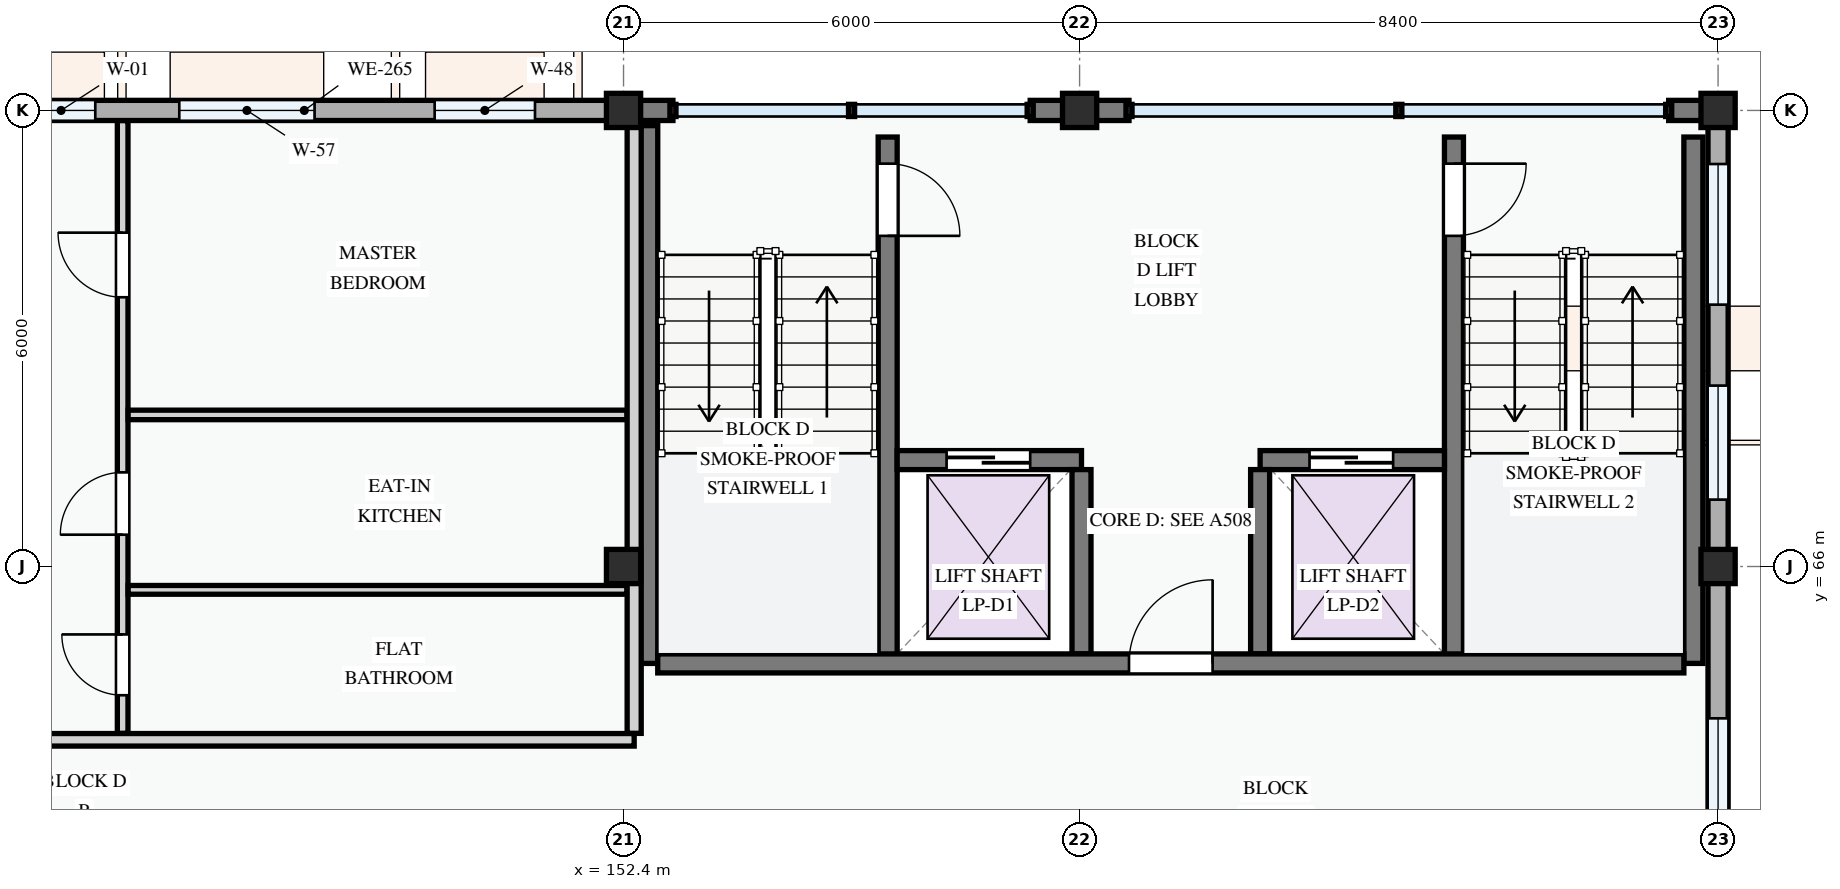
"""IFC4 building model, lengths in metres.
Left out: names, types, materials, properties, quantities, classifications, styles, units other than length and angle.
Written with IfcOpenShell. Run it as: python <this file> out.ifc"""

import sys

from ifc_helpers import new_model, si_unit, direction, frame, frame_2d, origin, origin_2d, place, context, subcontext, project, spatial, rectangle, extrude, element, fill, save


model = new_model("IFC4")
c1 = context("Model", 3, precision=1e-05, world=origin(), true_north=direction((0.0, 1.0)))
c2 = subcontext(c1, "Body", "Model", "MODEL_VIEW")
j1 = project(units=[si_unit("LENGTHUNIT", "METRE"), si_unit("PLANEANGLEUNIT", "RADIAN")], contexts=[c1])
p1 = place(None, origin())
s1 = spatial("IfcSite", under=j1, at=p1, CompositionType="ELEMENT")
p2 = place(p1, origin())
s2 = spatial("IfcBuilding", under=s1, at=p2, CompositionType="ELEMENT")
p3 = place(p2, frame((0.0, 0.0, 24.6)))
s3 = spatial("IfcBuildingStorey", under=s2, at=p3, CompositionType="ELEMENT", Elevation=24.6)
for number, where, z_axis, x_axis in (
    (1, (152.4, 66.0, 0.0), (0.0, 0.0, 1.0), (1.0, 0.0, 0.0)),
    (2, (152.4, 72.0, 0.0), (0.0, 0.0, 1.0), (1.0, 0.0, 0.0)),
    (3, (158.4, 72.0, 0.0), (0.0, 0.0, 1.0), (1.0, 0.0, 0.0)),
    (4, (166.8, 66.0, 0.0), (0.0, 0.0, 1.0), (1.0, 0.0, 0.0)),
    (5, (166.8, 72.0, 0.0), (0.0, 0.0, 1.0), (1.0, 0.0, 0.0)),
):
    element("IfcColumn", number, at=place(p3, frame(where, z_axis=z_axis, x_axis=x_axis)), inside=s3, PredefinedType="COLUMN", context=c2, shape_type="SweptSolid", body=[
        extrude(rectangle(XDim=0.45, YDim=0.45, at=origin_2d()), origin(), (0.0, 0.0, 1.0), 3.3),
    ])
p4 = place(p3, frame((152.4, 72.0, 0.0), z_axis=(0.0, 0.0, 1.0), x_axis=(-1.0, 0.0, 0.0)))
e6 = element("IfcWall", 6, at=p4, inside=s3, PredefinedType="STANDARD", context=c2, shape_type="SweptSolid", body=[
    extrude(rectangle(XDim=8.4, YDim=0.265, at=frame_2d((4.2, 0.0))), origin(), (0.0, 0.0, 1.0), 2.375),
])
p5 = place(p4, frame((1.165, 0.0, 0.78)))
e7 = element("IfcOpeningElement", 7, at=p5, cuts=e6, PredefinedType="OPENING", context=c2, shape_type="SweptSolid", body=[
    extrude(rectangle(XDim=1.32, YDim=1.35, at=frame_2d((0.66, 0.675))), frame((0.0, 0.143, 0.0), z_axis=(0.0, -1.0, 0.0), x_axis=(1.0, 0.0, 0.0)), (0.0, 0.0, 1.0), 0.285),
])
p6 = place(p4, frame((4.065, 0.0, 0.78)))
e8 = element("IfcOpeningElement", 8, at=p6, cuts=e6, PredefinedType="OPENING", context=c2, shape_type="SweptSolid", body=[
    extrude(rectangle(XDim=1.78, YDim=1.42, at=frame_2d((0.89, 0.71))), frame((0.0, 0.143, 0.0), z_axis=(0.0, -1.0, 0.0), x_axis=(1.0, 0.0, 0.0)), (0.0, 0.0, 1.0), 0.285),
])
p7 = place(p4, frame((6.95, 0.0, 0.78)))
e9 = element("IfcOpeningElement", 9, at=p7, cuts=e6, PredefinedType="OPENING", context=c2, shape_type="SweptSolid", body=[
    extrude(rectangle(XDim=0.9, YDim=1.2, at=frame_2d((0.45, 0.6))), frame((0.0, 0.143, 0.0), z_axis=(0.0, -1.0, 0.0), x_axis=(1.0, 0.0, 0.0)), (0.0, 0.0, 1.0), 0.285),
])
p8 = place(p3, frame((166.8, 57.6, 0.0), z_axis=(0.0, 0.0, 1.0), x_axis=(0.0, 1.0, 0.0)))
e10 = element("IfcWall", 10, at=p8, inside=s3, PredefinedType="STANDARD", context=c2, shape_type="SweptSolid", body=[
    extrude(rectangle(XDim=8.4, YDim=0.265, at=frame_2d((4.2, 0.0))), origin(), (0.0, 0.0, 1.0), 2.425),
])
p9 = place(p8, frame((0.955, 0.0, 0.78)))
e11 = element("IfcOpeningElement", 11, at=p9, cuts=e10, PredefinedType="OPENING", context=c2, shape_type="SweptSolid", body=[
    extrude(rectangle(XDim=2.48, YDim=1.46, at=frame_2d((1.24, 0.73))), frame((0.0, 0.143, 0.0), z_axis=(0.0, -1.0, 0.0), x_axis=(1.0, 0.0, 0.0)), (0.0, 0.0, 1.0), 0.285),
])
p10 = place(p8, frame((4.923, 0.0, 0.78)))
e12 = element("IfcOpeningElement", 12, at=p10, cuts=e10, PredefinedType="OPENING", context=c2, shape_type="SweptSolid", body=[
    extrude(rectangle(XDim=1.48, YDim=1.52, at=frame_2d((0.74, 0.76))), frame((0.0, 0.143, 0.0), z_axis=(0.0, -1.0, 0.0), x_axis=(1.0, 0.0, 0.0)), (0.0, 0.0, 1.0), 0.285),
])
p11 = place(p3, frame((166.8, 66.0, 0.0), z_axis=(0.0, 0.0, 1.0), x_axis=(0.0, 1.0, 0.0)))
e13 = element("IfcWall", 13, at=p11, inside=s3, PredefinedType="STANDARD", context=c2, shape_type="SweptSolid", body=[
    extrude(rectangle(XDim=6.0, YDim=0.265, at=frame_2d((3.0, 0.0))), origin(), (0.0, 0.0, 1.0), 2.575),
])
p12 = place(p11, frame((0.88, 0.0, 0.78)))
e14 = element("IfcOpeningElement", 14, at=p12, cuts=e13, PredefinedType="OPENING", context=c2, shape_type="SweptSolid", body=[
    extrude(rectangle(XDim=1.5, YDim=1.65, at=frame_2d((0.75, 0.825))), frame((0.0, 0.143, 0.0), z_axis=(0.0, -1.0, 0.0), x_axis=(1.0, 0.0, 0.0)), (0.0, 0.0, 1.0), 0.285),
])
p13 = place(p11, frame((3.445, 0.0, 0.78)))
e15 = element("IfcOpeningElement", 15, at=p13, cuts=e13, PredefinedType="OPENING", context=c2, shape_type="SweptSolid", body=[
    extrude(rectangle(XDim=1.85, YDim=1.6, at=frame_2d((0.925, 0.8))), frame((0.0, 0.143, 0.0), z_axis=(0.0, -1.0, 0.0), x_axis=(1.0, 0.0, 0.0)), (0.0, 0.0, 1.0), 0.285),
])
p14 = place(p3, frame((166.666, 72.0, 0.0), z_axis=(0.0, 0.0, 1.0), x_axis=(-1.0, 0.0, 0.0)))
e16 = element("IfcWall", 16, at=p14, inside=s3, PredefinedType="STANDARD", context=c2, shape_type="SweptSolid", body=[
    extrude(rectangle(XDim=0.516, YDim=0.265, at=frame_2d((0.258, 0.0))), origin(), (0.0, 0.0, 1.0), 3.04),
])
p15 = place(p3, frame((159.05, 72.0, 0.0), z_axis=(0.0, 0.0, 1.0), x_axis=(-1.0, 0.0, 0.0)))
e17 = element("IfcWall", 17, at=p15, inside=s3, PredefinedType="STANDARD", context=c2, shape_type="SweptSolid", body=[
    extrude(rectangle(XDim=0.65, YDim=0.265, at=frame_2d((0.325, 0.0))), origin(), (0.0, 0.0, 1.0), 3.04),
])
p16 = place(p3, frame((158.4, 72.0, 0.0), z_axis=(0.0, 0.0, 1.0), x_axis=(-1.0, 0.0, 0.0)))
e18 = element("IfcWall", 18, at=p16, inside=s3, PredefinedType="STANDARD", context=c2, shape_type="SweptSolid", body=[
    extrude(rectangle(XDim=0.65, YDim=0.265, at=frame_2d((0.325, 0.0))), origin(), (0.0, 0.0, 1.0), 3.04),
])
p17 = place(p3, frame((153.05, 72.0, 0.0), z_axis=(0.0, 0.0, 1.0), x_axis=(-1.0, 0.0, 0.0)))
e19 = element("IfcWall", 19, at=p17, inside=s3, PredefinedType="STANDARD", context=c2, shape_type="SweptSolid", body=[
    extrude(rectangle(XDim=0.65, YDim=0.265, at=frame_2d((0.325, 0.0))), origin(), (0.0, 0.0, 1.0), 3.04),
])
p18 = place(p3, frame((155.875, 71.65, 0.0), z_axis=(0.0, 0.0, 1.0), x_axis=(0.0, -1.0, 0.0)))
e20 = element("IfcWall", 20, at=p18, inside=s3, PredefinedType="SHEAR", context=c2, shape_type="SweptSolid", body=[
    extrude(rectangle(XDim=6.925, YDim=0.25, at=frame_2d((3.462, 0.0))), origin(), (0.0, 0.0, 1.0), 3.0),
])
p19 = place(p18, frame((0.35, 0.0, 0.0)))
e21 = element("IfcOpeningElement", 21, at=p19, cuts=e20, PredefinedType="OPENING", context=c2, shape_type="SweptSolid", body=[
    extrude(rectangle(XDim=0.95, YDim=2.1, at=frame_2d((0.475, 1.05))), frame((0.0, 0.135, 0.0), z_axis=(0.0, -1.0, 0.0), x_axis=(1.0, 0.0, 0.0)), (0.0, 0.0, 1.0), 0.27),
])
p20 = place(p3, frame((152.725, 71.8, 0.0), z_axis=(0.0, 0.0, 1.0), x_axis=(0.0, -1.0, 0.0)))
e22 = element("IfcWall", 22, at=p20, inside=s3, PredefinedType="SHEAR", context=c2, shape_type="SweptSolid", body=[
    extrude(rectangle(XDim=7.075, YDim=0.25, at=frame_2d((3.538, 0.0))), origin(), (0.0, 0.0, 1.0), 3.0),
])
p21 = place(p3, frame((166.475, 71.65, 0.0), z_axis=(0.0, 0.0, 1.0), x_axis=(0.0, -1.0, 0.0)))
e23 = element("IfcWall", 23, at=p21, inside=s3, PredefinedType="SHEAR", context=c2, shape_type="SweptSolid", body=[
    extrude(rectangle(XDim=6.925, YDim=0.25, at=frame_2d((3.462, 0.0))), origin(), (0.0, 0.0, 1.0), 3.0),
])
p22 = place(p3, frame((163.325, 71.65, 0.0), z_axis=(0.0, 0.0, 1.0), x_axis=(0.0, -1.0, 0.0)))
e24 = element("IfcWall", 24, at=p22, inside=s3, PredefinedType="SHEAR", context=c2, shape_type="SweptSolid", body=[
    extrude(rectangle(XDim=6.925, YDim=0.25, at=frame_2d((3.462, 0.0))), origin(), (0.0, 0.0, 1.0), 3.0),
])
p23 = place(p22, frame((0.35, 0.0, 0.0)))
e25 = element("IfcOpeningElement", 25, at=p23, cuts=e24, PredefinedType="OPENING", context=c2, shape_type="SweptSolid", body=[
    extrude(rectangle(XDim=0.95, YDim=2.1, at=frame_2d((0.475, 1.05))), frame((0.0, 0.135, 0.0), z_axis=(0.0, -1.0, 0.0), x_axis=(1.0, 0.0, 0.0)), (0.0, 0.0, 1.0), 0.27),
])
p24 = place(p3, frame((156.0, 67.4, 0.0), z_axis=(0.0, 0.0, 1.0), x_axis=(1.0, 0.0, 0.0)))
e26 = element("IfcWall", 26, at=p24, inside=s3, PredefinedType="SHEAR", context=c2, shape_type="SweptSolid", body=[
    extrude(rectangle(XDim=2.425, YDim=0.25, at=frame_2d((1.212, 0.0))), origin(), (0.0, 0.0, 1.0), 3.0),
])
p25 = place(p24, frame((0.65, 0.0, 0.0)))
e27 = element("IfcOpeningElement", 27, at=p25, cuts=e26, PredefinedType="OPENING", context=c2, shape_type="SweptSolid", body=[
    extrude(rectangle(XDim=1.1, YDim=2.15, at=frame_2d((0.55, 1.075))), frame((0.0, 0.135, 0.0), z_axis=(0.0, -1.0, 0.0), x_axis=(1.0, 0.0, 0.0)), (0.0, 0.0, 1.0), 0.27),
])
p26 = place(p3, frame((160.775, 67.4, 0.0), z_axis=(0.0, 0.0, 1.0), x_axis=(1.0, 0.0, 0.0)))
e28 = element("IfcWall", 28, at=p26, inside=s3, PredefinedType="SHEAR", context=c2, shape_type="SweptSolid", body=[
    extrude(rectangle(XDim=2.425, YDim=0.25, at=frame_2d((1.212, 0.0))), origin(), (0.0, 0.0, 1.0), 3.0),
])
p27 = place(p26, frame((0.65, 0.0, 0.0)))
e29 = element("IfcOpeningElement", 29, at=p27, cuts=e28, PredefinedType="OPENING", context=c2, shape_type="SweptSolid", body=[
    extrude(rectangle(XDim=1.1, YDim=2.15, at=frame_2d((0.55, 1.075))), frame((0.0, 0.135, 0.0), z_axis=(0.0, -1.0, 0.0), x_axis=(1.0, 0.0, 0.0)), (0.0, 0.0, 1.0), 0.27),
])
for number, where, z_axis, x_axis in (
    (30, (158.425, 67.275, 0.0), (0.0, 0.0, 1.0), (0.0, -1.0, 0.0)),
    (31, (160.775, 67.275, 0.0), (0.0, 0.0, 1.0), (0.0, -1.0, 0.0)),
):
    element("IfcWall", number, at=place(p3, frame(where, z_axis=z_axis, x_axis=x_axis)), inside=s3, PredefinedType="SHEAR", context=c2, shape_type="SweptSolid", body=[
        extrude(rectangle(XDim=2.425, YDim=0.25, at=frame_2d((1.212, 0.0))), origin(), (0.0, 0.0, 1.0), 3.0),
    ])
p28 = place(p3, frame((152.85, 64.725, 0.0), z_axis=(0.0, 0.0, 1.0), x_axis=(1.0, 0.0, 0.0)))
e32 = element("IfcWall", 32, at=p28, inside=s3, PredefinedType="SHEAR", context=c2, shape_type="SweptSolid", body=[
    extrude(rectangle(XDim=13.5, YDim=0.25, at=frame_2d((6.75, 0.0))), origin(), (0.0, 0.0, 1.0), 3.0),
])
p29 = place(p28, frame((6.2, 0.0, 0.0)))
e33 = element("IfcOpeningElement", 33, at=p29, cuts=e32, PredefinedType="OPENING", context=c2, shape_type="SweptSolid", body=[
    extrude(rectangle(XDim=1.1, YDim=2.15, at=frame_2d((0.55, 1.075))), frame((0.0, 0.135, 0.0), z_axis=(0.0, -1.0, 0.0), x_axis=(1.0, 0.0, 0.0)), (0.0, 0.0, 1.0), 0.27),
])
p30 = place(p3, frame((145.81, 63.804, 0.0), z_axis=(0.0, 0.0, 1.0), x_axis=(0.0, 1.0, 0.0)))
e34 = element("IfcWall", 34, at=p30, inside=s3, PredefinedType="PARTITIONING", context=c2, shape_type="SweptSolid", body=[
    extrude(rectangle(XDim=8.061, YDim=0.14, at=frame_2d((4.031, 0.0))), origin(), (0.0, 0.0, 1.0), 3.0),
])
p31 = place(p30, frame((0.502, 0.0, 0.0)))
e35 = element("IfcOpeningElement", 35, at=p31, cuts=e34, PredefinedType="OPENING", context=c2, shape_type="SweptSolid", body=[
    extrude(rectangle(XDim=0.8, YDim=2.1, at=frame_2d((0.4, 1.05))), frame((0.0, 0.08, 0.0), z_axis=(0.0, -1.0, 0.0), x_axis=(1.0, 0.0, 0.0)), (0.0, 0.0, 1.0), 0.16),
])
p32 = place(p30, frame((2.614, 0.0, 0.0)))
e36 = element("IfcOpeningElement", 36, at=p32, cuts=e34, PredefinedType="OPENING", context=c2, shape_type="SweptSolid", body=[
    extrude(rectangle(XDim=0.82, YDim=2.08, at=frame_2d((0.41, 1.04))), frame((0.0, 0.08, 0.0), z_axis=(0.0, -1.0, 0.0), x_axis=(1.0, 0.0, 0.0)), (0.0, 0.0, 1.0), 0.16),
])
p33 = place(p30, frame((5.738, 0.0, 0.0)))
e37 = element("IfcOpeningElement", 37, at=p33, cuts=e34, PredefinedType="OPENING", context=c2, shape_type="SweptSolid", body=[
    extrude(rectangle(XDim=0.85, YDim=2.1, at=frame_2d((0.425, 1.05))), frame((0.0, 0.08, 0.0), z_axis=(0.0, -1.0, 0.0), x_axis=(1.0, 0.0, 0.0)), (0.0, 0.0, 1.0), 0.16),
])
p34 = place(p3, frame((145.882, 67.994, 0.0), z_axis=(0.0, 0.0, 1.0), x_axis=(1.0, 0.0, 0.0)))
e38 = element("IfcWall", 38, at=p34, inside=s3, PredefinedType="PARTITIONING", context=c2, shape_type="SweptSolid", body=[
    extrude(rectangle(XDim=6.563, YDim=0.125, at=frame_2d((3.282, 0.0))), origin(), (0.0, 0.0, 1.0), 3.0),
])
p35 = place(p3, frame((145.882, 65.693, 0.0), z_axis=(0.0, 0.0, 1.0), x_axis=(1.0, 0.0, 0.0)))
e39 = element("IfcWall", 39, at=p35, inside=s3, PredefinedType="PARTITIONING", context=c2, shape_type="SweptSolid", body=[
    extrude(rectangle(XDim=6.563, YDim=0.115, at=frame_2d((3.282, 0.0))), origin(), (0.0, 0.0, 1.0), 2.375),
])
p36 = place(p3, frame((152.54, 63.804, 0.0), z_axis=(0.0, 0.0, 1.0), x_axis=(0.0, 1.0, 0.0)))
e40 = element("IfcWall", 40, at=p36, inside=s3, PredefinedType="PARTITIONING", context=c2, shape_type="SweptSolid", body=[
    extrude(rectangle(XDim=8.061, YDim=0.185, at=frame_2d((4.031, 0.0))), origin(), (0.0, 0.0, 1.0), 2.425),
])
p37 = place(p3, frame((138.06, 63.72, 0.0), z_axis=(0.0, 0.0, 1.0), x_axis=(1.0, 0.0, 0.0)))
e41 = element("IfcWall", 41, at=p37, inside=s3, PredefinedType="PARTITIONING", context=c2, shape_type="SweptSolid", body=[
    extrude(rectangle(XDim=14.48, YDim=0.165, at=frame_2d((7.24, 0.0))), origin(), (0.0, 0.0, 1.0), 3.0),
])
p38 = place(p37, frame((2.412, 0.0, 0.0)))
e42 = element("IfcOpeningElement", 42, at=p38, cuts=e41, PredefinedType="OPENING", context=c2, shape_type="SweptSolid", body=[
    extrude(rectangle(XDim=0.92, YDim=2.1, at=frame_2d((0.46, 1.05))), frame((0.0, 0.093, 0.0), z_axis=(0.0, -1.0, 0.0), x_axis=(1.0, 0.0, 0.0)), (0.0, 0.0, 1.0), 0.185),
])
p39 = place(p5, origin())
e43 = element("IfcWindow", 43, at=p39, inside=s3, PartitioningType="SINGLE_PANEL", PredefinedType="WINDOW", context=c2, shape_type="SweptSolid", body=[
    extrude(rectangle(XDim=1.32, YDim=1.35, at=frame_2d((0.66, 0.675))), frame((0.0, 0.03, 0.0), z_axis=(0.0, -1.0, 0.0), x_axis=(1.0, 0.0, 0.0)), (0.0, 0.0, 1.0), 0.06),
])
fill(e7, e43)
p40 = place(p6, origin())
e44 = element("IfcWindow", 44, at=p40, inside=s3, PartitioningType="DOUBLE_PANEL_VERTICAL", PredefinedType="WINDOW", context=c2, shape_type="SweptSolid", body=[
    extrude(rectangle(XDim=1.78, YDim=1.42, at=frame_2d((0.89, 0.71))), frame((0.0, 0.03, 0.0), z_axis=(0.0, -1.0, 0.0), x_axis=(1.0, 0.0, 0.0)), (0.0, 0.0, 1.0), 0.06),
])
fill(e8, e44)
p41 = place(p7, origin())
e45 = element("IfcWindow", 45, at=p41, inside=s3, PartitioningType="SINGLE_PANEL", PredefinedType="WINDOW", context=c2, shape_type="SweptSolid", body=[
    extrude(rectangle(XDim=0.9, YDim=1.2, at=frame_2d((0.45, 0.6))), frame((0.0, 0.03, 0.0), z_axis=(0.0, -1.0, 0.0), x_axis=(1.0, 0.0, 0.0)), (0.0, 0.0, 1.0), 0.06),
])
fill(e9, e45)
p42 = place(p10, origin())
e46 = element("IfcWindow", 46, at=p42, inside=s3, PartitioningType="SINGLE_PANEL", PredefinedType="WINDOW", context=c2, shape_type="SweptSolid", body=[
    extrude(rectangle(XDim=1.48, YDim=1.52, at=frame_2d((0.74, 0.76))), frame((0.0, 0.03, 0.0), z_axis=(0.0, -1.0, 0.0), x_axis=(1.0, 0.0, 0.0)), (0.0, 0.0, 1.0), 0.06),
])
fill(e12, e46)
p43 = place(p12, origin())
e47 = element("IfcWindow", 47, at=p43, inside=s3, PartitioningType="SINGLE_PANEL", PredefinedType="WINDOW", context=c2, shape_type="SweptSolid", body=[
    extrude(rectangle(XDim=1.5, YDim=1.65, at=frame_2d((0.75, 0.825))), frame((0.0, 0.03, 0.0), z_axis=(0.0, -1.0, 0.0), x_axis=(1.0, 0.0, 0.0)), (0.0, 0.0, 1.0), 0.06),
])
fill(e14, e47)
p44 = place(p13, origin())
e48 = element("IfcWindow", 48, at=p44, inside=s3, PartitioningType="DOUBLE_PANEL_VERTICAL", PredefinedType="WINDOW", context=c2, shape_type="SweptSolid", body=[
    extrude(rectangle(XDim=1.85, YDim=1.6, at=frame_2d((0.925, 0.8))), frame((0.0, 0.03, 0.0), z_axis=(0.0, -1.0, 0.0), x_axis=(1.0, 0.0, 0.0)), (0.0, 0.0, 1.0), 0.06),
])
fill(e15, e48)
p45 = place(p19, origin())
e49 = element("IfcDoor", 49, at=p45, inside=s3, OperationType="SINGLE_SWING_RIGHT", PredefinedType="DOOR", context=c2, shape_type="SweptSolid", body=[
    extrude(rectangle(XDim=0.95, YDim=2.1, at=frame_2d((0.475, 1.05))), frame((0.0, 0.025, 0.0), z_axis=(0.0, -1.0, 0.0), x_axis=(1.0, 0.0, 0.0)), (0.0, 0.0, 1.0), 0.05),
])
fill(e21, e49)
p46 = place(p23, origin())
e50 = element("IfcDoor", 50, at=p46, inside=s3, OperationType="SINGLE_SWING_LEFT", PredefinedType="DOOR", context=c2, shape_type="SweptSolid", body=[
    extrude(rectangle(XDim=0.95, YDim=2.1, at=frame_2d((0.475, 1.05))), frame((0.0, 0.025, 0.0), z_axis=(0.0, -1.0, 0.0), x_axis=(1.0, 0.0, 0.0)), (0.0, 0.0, 1.0), 0.05),
])
fill(e25, e50)
p47 = place(p25, origin())
e51 = element("IfcDoor", 51, at=p47, inside=s3, OperationType="SLIDING_TO_LEFT", PredefinedType="DOOR", context=c2, shape_type="SweptSolid", body=[
    extrude(rectangle(XDim=1.1, YDim=2.15, at=frame_2d((0.55, 1.075))), frame((0.0, 0.025, 0.0), z_axis=(0.0, -1.0, 0.0), x_axis=(1.0, 0.0, 0.0)), (0.0, 0.0, 1.0), 0.05),
])
fill(e27, e51)
p48 = place(p27, origin())
e52 = element("IfcDoor", 52, at=p48, inside=s3, OperationType="SLIDING_TO_LEFT", PredefinedType="DOOR", context=c2, shape_type="SweptSolid", body=[
    extrude(rectangle(XDim=1.1, YDim=2.15, at=frame_2d((0.55, 1.075))), frame((0.0, 0.025, 0.0), z_axis=(0.0, -1.0, 0.0), x_axis=(1.0, 0.0, 0.0)), (0.0, 0.0, 1.0), 0.05),
])
fill(e29, e52)
p49 = place(p29, origin())
e53 = element("IfcDoor", 53, at=p49, inside=s3, OperationType="SINGLE_SWING_RIGHT", PredefinedType="DOOR", context=c2, shape_type="SweptSolid", body=[
    extrude(rectangle(XDim=1.1, YDim=2.15, at=frame_2d((0.55, 1.075))), frame((0.0, 0.025, 0.0), z_axis=(0.0, -1.0, 0.0), x_axis=(1.0, 0.0, 0.0)), (0.0, 0.0, 1.0), 0.05),
])
fill(e33, e53)
p50 = place(p31, origin())
e54 = element("IfcDoor", 54, at=p50, inside=s3, OperationType="SINGLE_SWING_RIGHT", PredefinedType="DOOR", context=c2, shape_type="SweptSolid", body=[
    extrude(rectangle(XDim=0.8, YDim=2.1, at=frame_2d((0.4, 1.05))), frame((0.0, 0.025, 0.0), z_axis=(0.0, -1.0, 0.0), x_axis=(1.0, 0.0, 0.0)), (0.0, 0.0, 1.0), 0.05),
])
fill(e35, e54)
p51 = place(p32, origin())
e55 = element("IfcDoor", 55, at=p51, inside=s3, OperationType="SINGLE_SWING_LEFT", PredefinedType="DOOR", context=c2, shape_type="SweptSolid", body=[
    extrude(rectangle(XDim=0.82, YDim=2.08, at=frame_2d((0.41, 1.04))), frame((0.0, 0.025, 0.0), z_axis=(0.0, -1.0, 0.0), x_axis=(1.0, 0.0, 0.0)), (0.0, 0.0, 1.0), 0.05),
])
fill(e36, e55)
p52 = place(p33, origin())
e56 = element("IfcDoor", 56, at=p52, inside=s3, OperationType="SINGLE_SWING_RIGHT", PredefinedType="DOOR", context=c2, shape_type="SweptSolid", body=[
    extrude(rectangle(XDim=0.85, YDim=2.1, at=frame_2d((0.425, 1.05))), frame((0.0, 0.025, 0.0), z_axis=(0.0, -1.0, 0.0), x_axis=(1.0, 0.0, 0.0)), (0.0, 0.0, 1.0), 0.05),
])
fill(e37, e56)
save(model, sys.argv[1])
